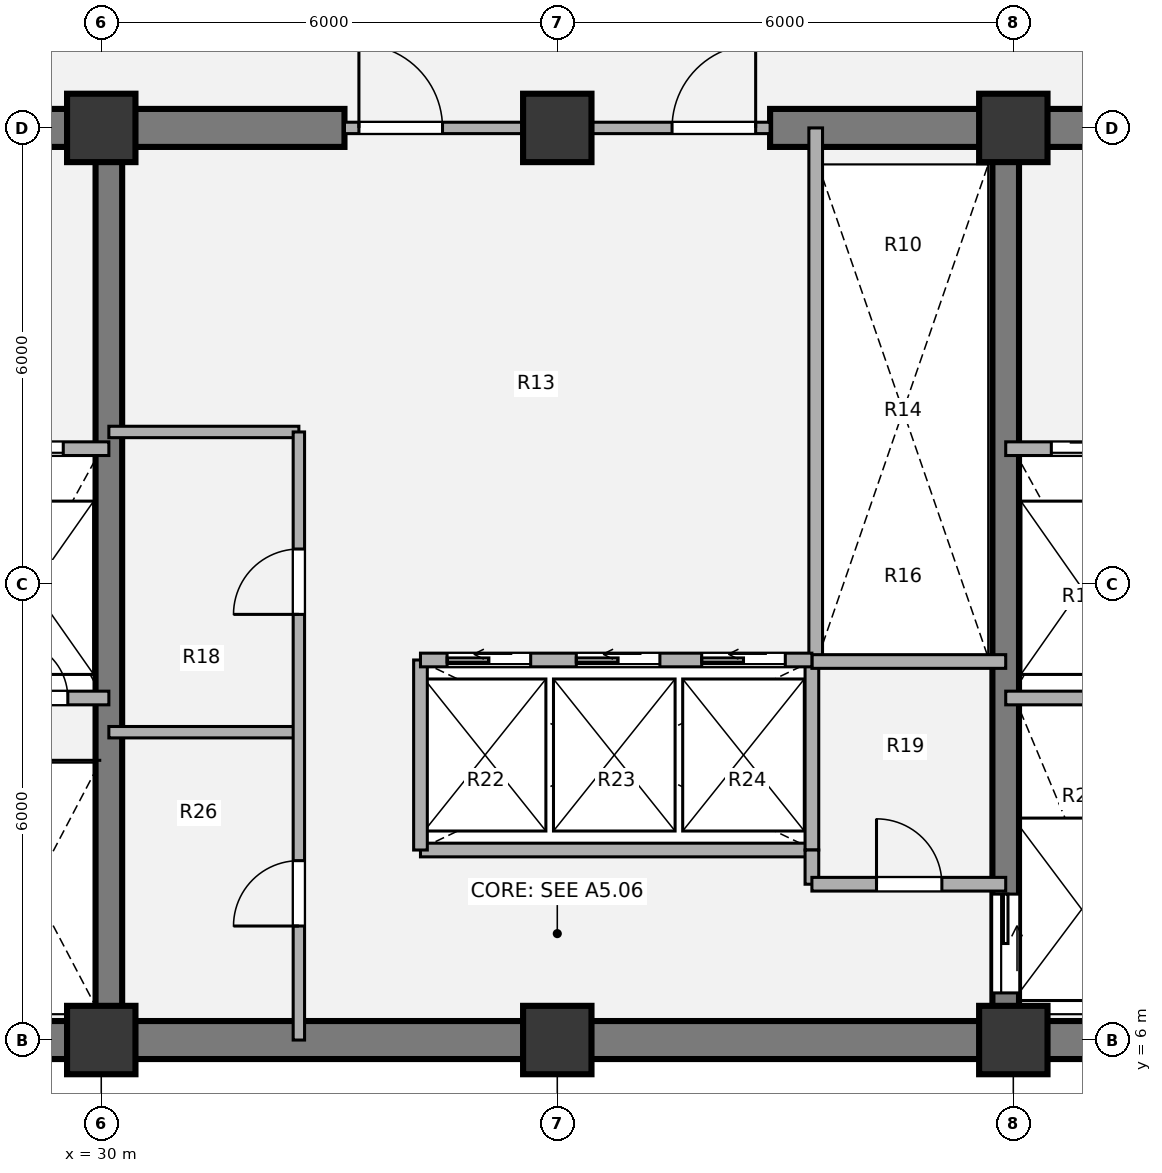
"""IFC4 building model, lengths in metres.
Left out: names, types, materials, properties, quantities, classifications, styles, units other than length and angle.
Written with IfcOpenShell. Run it as: python <this file> out.ifc"""

import sys

from ifc_helpers import new_model, si_unit, direction, frame, frame_2d, origin, origin_2d, place, context, subcontext, project, spatial, rectangle, extrude, source, transform, mapped, element, fill, save


model = new_model("IFC4")
c1 = context("Model", 3, precision=1e-05, world=origin(), true_north=direction((0.0, 1.0)))
c2 = subcontext(c1, "Body", "Model", "MODEL_VIEW")
j1 = project(units=[si_unit("LENGTHUNIT", "METRE"), si_unit("PLANEANGLEUNIT", "RADIAN")], contexts=[c1])
p1 = place(None, origin())
s1 = spatial("IfcSite", under=j1, at=p1, CompositionType="ELEMENT")
p2 = place(p1, origin())
s2 = spatial("IfcBuilding", under=s1, at=p2, CompositionType="ELEMENT")
p3 = place(p2, frame((0.0, 0.0, 112.5)))
s3 = spatial("IfcBuildingStorey", under=s2, at=p3, CompositionType="ELEMENT", Elevation=112.5)
m1 = source(origin(), c2, "Body", "SweptSolid", [
    extrude(rectangle(XDim=0.9, YDim=0.9, at=origin_2d()), origin(), (0.0, 0.0, 1.0), 3.78),
])
for number, where, z_axis, x_axis in (
    (1, (30.0, 6.0, 0.0), (0.0, 0.0, 1.0), (1.0, 0.0, 0.0)),
    (2, (36.0, 6.0, 0.0), (0.0, 0.0, 1.0), (1.0, 0.0, 0.0)),
    (3, (42.0, 6.0, 0.0), (0.0, 0.0, 1.0), (1.0, 0.0, 0.0)),
    (4, (30.0, 18.0, 0.0), (0.0, 0.0, 1.0), (1.0, 0.0, 0.0)),
    (5, (36.0, 18.0, 0.0), (0.0, 0.0, 1.0), (1.0, 0.0, 0.0)),
    (6, (42.0, 18.0, 0.0), (0.0, 0.0, 1.0), (1.0, 0.0, 0.0)),
):
    element("IfcColumn", number, at=place(p3, frame(where, z_axis=z_axis, x_axis=x_axis)), inside=s3, PredefinedType="COLUMN", context=c2, shape_type="MappedRepresentation", body=[
        mapped(m1, transform((0.0, 0.0, 0.0), x_axis=(1.0, 0.0, 0.0), y_axis=(0.0, 1.0, 0.0), z_axis=(0.0, 0.0, 1.0), scale=1.0)),
    ])
p4 = place(p3, frame((48.25, 6.0, 0.0), z_axis=(0.0, 0.0, 1.0), x_axis=(-1.0, 0.0, 0.0)))
e7 = element("IfcWall", 7, at=p4, inside=s3, PredefinedType="SHEAR", context=c2, shape_type="SweptSolid", body=[
    extrude(rectangle(XDim=24.5, YDim=0.5, at=frame_2d((12.25, 0.0))), origin(), (0.0, 0.0, 1.0), 3.78),
])
p5 = place(p3, frame((23.75, 18.0, 0.0), z_axis=(0.0, 0.0, 1.0), x_axis=(1.0, 0.0, 0.0)))
e8 = element("IfcWall", 8, at=p5, inside=s3, PredefinedType="SHEAR", context=c2, shape_type="SweptSolid", body=[
    extrude(rectangle(XDim=9.45, YDim=0.5, at=frame_2d((4.725, 0.0))), origin(), (0.0, 0.0, 1.0), 3.78),
])
p6 = place(p5, frame((2.95, 0.0, 0.0)))
e9 = element("IfcOpeningElement", 9, at=p6, cuts=e8, PredefinedType="OPENING", context=c2, shape_type="SweptSolid", body=[
    extrude(rectangle(XDim=1.1, YDim=2.1, at=origin_2d()), frame((0.55, 0.26, 1.05), z_axis=(0.0, -1.0, 0.0), x_axis=(1.0, 0.0, 0.0)), (0.0, 0.0, 1.0), 0.52),
])
p7 = place(p3, frame((38.8, 18.0, 0.0), z_axis=(0.0, 0.0, 1.0), x_axis=(1.0, 0.0, 0.0)))
e10 = element("IfcWall", 10, at=p7, inside=s3, PredefinedType="SHEAR", context=c2, shape_type="SweptSolid", body=[
    extrude(rectangle(XDim=9.45, YDim=0.5, at=frame_2d((4.725, 0.0))), origin(), (0.0, 0.0, 1.0), 3.78),
])
p8 = place(p7, frame((5.45, 0.0, 0.0)))
e11 = element("IfcOpeningElement", 11, at=p8, cuts=e10, PredefinedType="OPENING", context=c2, shape_type="SweptSolid", body=[
    extrude(rectangle(XDim=1.1, YDim=2.1, at=origin_2d()), frame((0.55, 0.26, 1.05), z_axis=(0.0, -1.0, 0.0), x_axis=(1.0, 0.0, 0.0)), (0.0, 0.0, 1.0), 0.52),
])
p9 = place(p3, frame((30.1, 6.0, 0.0), z_axis=(0.0, 0.0, 1.0), x_axis=(0.0, 1.0, 0.0)))
e12 = element("IfcWall", 12, at=p9, inside=s3, PredefinedType="SHEAR", context=c2, shape_type="SweptSolid", body=[
    extrude(rectangle(XDim=12.0, YDim=0.35, at=frame_2d((6.0, 0.0))), origin(), (0.0, 0.0, 1.0), 3.78),
])
p10 = place(p3, frame((41.9, 18.0, 0.0), z_axis=(0.0, 0.0, 1.0), x_axis=(0.0, -1.0, 0.0)))
e13 = element("IfcWall", 13, at=p10, inside=s3, PredefinedType="SHEAR", context=c2, shape_type="SweptSolid", body=[
    extrude(rectangle(XDim=12.0, YDim=0.35, at=frame_2d((6.0, 0.0))), origin(), (0.0, 0.0, 1.0), 3.78),
])
p11 = place(p10, frame((10.08, 0.0, 0.0)))
e14 = element("IfcOpeningElement", 14, at=p11, cuts=e13, PredefinedType="OPENING", context=c2, shape_type="SweptSolid", body=[
    extrude(rectangle(XDim=1.3, YDim=2.1, at=origin_2d()), frame((0.65, 0.185, 1.05), z_axis=(0.0, -1.0, 0.0), x_axis=(1.0, 0.0, 0.0)), (0.0, 0.0, 1.0), 0.37),
])
p12 = place(p3, frame((30.1, 14.0, 0.0), z_axis=(0.0, 0.0, 1.0), x_axis=(1.0, 0.0, 0.0)))
e15 = element("IfcWall", 15, at=p12, inside=s3, PredefinedType="PARTITIONING", context=c2, shape_type="SweptSolid", body=[
    extrude(rectangle(XDim=2.5, YDim=0.15, at=frame_2d((1.25, 0.0))), origin(), (0.0, 0.0, 1.0), 3.5),
])
p13 = place(p3, frame((34.2, 8.5, 0.0), z_axis=(0.0, 0.0, 1.0), x_axis=(1.0, 0.0, 0.0)))
e16 = element("IfcWall", 16, at=p13, inside=s3, PredefinedType="PARTITIONING", context=c2, shape_type="SweptSolid", body=[
    extrude(rectangle(XDim=5.15, YDim=0.18, at=frame_2d((2.575, 0.0))), origin(), (0.0, 0.0, 1.0), 3.5),
])
for number, where, z_axis, x_axis in (
    (17, (34.2, 8.5, 0.0), (0.0, 0.0, 1.0), (0.0, 1.0, 0.0)),
    (18, (39.35, 8.5, 0.0), (0.0, 0.0, 1.0), (0.0, 1.0, 0.0)),
):
    element("IfcWall", number, at=place(p3, frame(where, z_axis=z_axis, x_axis=x_axis)), inside=s3, PredefinedType="PARTITIONING", context=c2, shape_type="SweptSolid", body=[
        extrude(rectangle(XDim=2.5, YDim=0.18, at=frame_2d((1.25, 0.0))), origin(), (0.0, 0.0, 1.0), 3.5),
    ])
p14 = place(p3, frame((39.4, 11.0, 0.0), z_axis=(0.0, 0.0, 1.0), x_axis=(0.0, 1.0, 0.0)))
e19 = element("IfcWall", 19, at=p14, inside=s3, PredefinedType="PARTITIONING", context=c2, shape_type="SweptSolid", body=[
    extrude(rectangle(XDim=7.0, YDim=0.18, at=frame_2d((3.5, 0.0))), origin(), (0.0, 0.0, 1.0), 3.5),
])
p15 = place(p3, frame((30.1, 10.05, 0.0), z_axis=(0.0, 0.0, 1.0), x_axis=(1.0, 0.0, 0.0)))
e20 = element("IfcWall", 20, at=p15, inside=s3, PredefinedType="PARTITIONING", context=c2, shape_type="SweptSolid", body=[
    extrude(rectangle(XDim=2.5, YDim=0.15, at=frame_2d((1.25, 0.0))), origin(), (0.0, 0.0, 1.0), 3.5),
])
p16 = place(p3, frame((32.6, 6.0, 0.0), z_axis=(0.0, 0.0, 1.0), x_axis=(0.0, 1.0, 0.0)))
e21 = element("IfcWall", 21, at=p16, inside=s3, PredefinedType="PARTITIONING", context=c2, shape_type="SweptSolid", body=[
    extrude(rectangle(XDim=8.0, YDim=0.15, at=frame_2d((4.0, 0.0))), origin(), (0.0, 0.0, 1.0), 3.5),
])
p17 = place(p16, frame((1.5, 0.0, 0.0)))
e22 = element("IfcOpeningElement", 22, at=p17, cuts=e21, PredefinedType="OPENING", context=c2, shape_type="SweptSolid", body=[
    extrude(rectangle(XDim=0.86, YDim=2.1, at=origin_2d()), frame((0.43, 0.085, 1.05), z_axis=(0.0, -1.0, 0.0), x_axis=(1.0, 0.0, 0.0)), (0.0, 0.0, 1.0), 0.17),
])
p18 = place(p16, frame((5.6, 0.0, 0.0)))
e23 = element("IfcOpeningElement", 23, at=p18, cuts=e21, PredefinedType="OPENING", context=c2, shape_type="SweptSolid", body=[
    extrude(rectangle(XDim=0.86, YDim=2.1, at=origin_2d()), frame((0.43, 0.085, 1.05), z_axis=(0.0, -1.0, 0.0), x_axis=(1.0, 0.0, 0.0)), (0.0, 0.0, 1.0), 0.17),
])
p19 = place(p3, frame((39.35, 10.98, 0.0), z_axis=(0.0, 0.0, 1.0), x_axis=(1.0, 0.0, 0.0)))
e24 = element("IfcWall", 24, at=p19, inside=s3, PredefinedType="PARTITIONING", context=c2, shape_type="SweptSolid", body=[
    extrude(rectangle(XDim=2.55, YDim=0.18, at=frame_2d((1.275, 0.0))), origin(), (0.0, 0.0, 1.0), 3.5),
])
p20 = place(p3, frame((39.35, 8.05, 0.0), z_axis=(0.0, 0.0, 1.0), x_axis=(0.0, 1.0, 0.0)))
e25 = element("IfcWall", 25, at=p20, inside=s3, PredefinedType="PARTITIONING", context=c2, shape_type="SweptSolid", body=[
    extrude(rectangle(XDim=0.45, YDim=0.18, at=frame_2d((0.225, 0.0))), origin(), (0.0, 0.0, 1.0), 3.5),
])
p21 = place(p3, frame((39.35, 8.05, 0.0), z_axis=(0.0, 0.0, 1.0), x_axis=(1.0, 0.0, 0.0)))
e26 = element("IfcWall", 26, at=p21, inside=s3, PredefinedType="PARTITIONING", context=c2, shape_type="SweptSolid", body=[
    extrude(rectangle(XDim=2.55, YDim=0.18, at=frame_2d((1.275, 0.0))), origin(), (0.0, 0.0, 1.0), 3.5),
])
p22 = place(p21, frame((0.85, 0.0, 0.0)))
e27 = element("IfcOpeningElement", 27, at=p22, cuts=e26, PredefinedType="OPENING", context=c2, shape_type="SweptSolid", body=[
    extrude(rectangle(XDim=0.86, YDim=2.1, at=origin_2d()), frame((0.43, 0.1, 1.05), z_axis=(0.0, -1.0, 0.0), x_axis=(1.0, 0.0, 0.0)), (0.0, 0.0, 1.0), 0.2),
])
p23 = place(p3, frame((33.2, 18.0, 0.0), z_axis=(0.0, 0.0, 1.0), x_axis=(1.0, 0.0, 0.0)))
e28 = element("IfcWall", 28, at=p23, inside=s3, PredefinedType="PARTITIONING", context=c2, shape_type="SweptSolid", body=[
    extrude(rectangle(XDim=5.6, YDim=0.15, at=frame_2d((2.8, 0.0))), origin(), (0.0, 0.0, 1.0), 2.315),
])
p24 = place(p23, frame((0.19, 0.0, 0.0)))
e29 = element("IfcOpeningElement", 29, at=p24, cuts=e28, PredefinedType="OPENING", context=c2, shape_type="SweptSolid", body=[
    extrude(rectangle(XDim=1.1, YDim=2.1, at=origin_2d()), frame((0.55, 0.085, 1.05), z_axis=(0.0, -1.0, 0.0), x_axis=(1.0, 0.0, 0.0)), (0.0, 0.0, 1.0), 0.17),
])
p25 = place(p23, frame((4.31, 0.0, 0.0)))
e30 = element("IfcOpeningElement", 30, at=p25, cuts=e28, PredefinedType="OPENING", context=c2, shape_type="SweptSolid", body=[
    extrude(rectangle(XDim=1.1, YDim=2.1, at=origin_2d()), frame((0.55, 0.085, 1.05), z_axis=(0.0, -1.0, 0.0), x_axis=(1.0, 0.0, 0.0)), (0.0, 0.0, 1.0), 0.17),
])
p26 = place(p3, frame((24.0, 13.78, 0.0), z_axis=(0.0, 0.0, 1.0), x_axis=(1.0, 0.0, 0.0)))
e31 = element("IfcWall", 31, at=p26, inside=s3, PredefinedType="PARTITIONING", context=c2, shape_type="SweptSolid", body=[
    extrude(rectangle(XDim=6.1, YDim=0.18, at=frame_2d((3.05, 0.0))), origin(), (0.0, 0.0, 1.0), 3.5),
])
p27 = place(p26, frame((1.15, 0.0, 0.0)))
e32 = element("IfcOpeningElement", 32, at=p27, cuts=e31, PredefinedType="OPENING", context=c2, shape_type="SweptSolid", body=[
    extrude(rectangle(XDim=1.1, YDim=2.1, at=origin_2d()), frame((0.55, 0.1, 1.05), z_axis=(0.0, -1.0, 0.0), x_axis=(1.0, 0.0, 0.0)), (0.0, 0.0, 1.0), 0.2),
])
p28 = place(p26, frame((4.4, 0.0, 0.0)))
e33 = element("IfcOpeningElement", 33, at=p28, cuts=e31, PredefinedType="OPENING", context=c2, shape_type="SweptSolid", body=[
    extrude(rectangle(XDim=1.1, YDim=2.1, at=origin_2d()), frame((0.55, 0.1, 1.05), z_axis=(0.0, -1.0, 0.0), x_axis=(1.0, 0.0, 0.0)), (0.0, 0.0, 1.0), 0.2),
])
p29 = place(p3, frame((28.15, 10.5, 0.0), z_axis=(0.0, 0.0, 1.0), x_axis=(1.0, 0.0, 0.0)))
e34 = element("IfcWall", 34, at=p29, inside=s3, PredefinedType="PARTITIONING", context=c2, shape_type="SweptSolid", body=[
    extrude(rectangle(XDim=1.95, YDim=0.18, at=frame_2d((0.975, 0.0))), origin(), (0.0, 0.0, 1.0), 3.5),
])
p30 = place(p29, frame((0.65, 0.0, 0.0)))
e35 = element("IfcOpeningElement", 35, at=p30, cuts=e34, PredefinedType="OPENING", context=c2, shape_type="SweptSolid", body=[
    extrude(rectangle(XDim=0.76, YDim=2.05, at=origin_2d()), frame((0.38, 0.1, 1.025), z_axis=(0.0, -1.0, 0.0), x_axis=(1.0, 0.0, 0.0)), (0.0, 0.0, 1.0), 0.2),
])
p31 = place(p3, frame((41.9, 13.78, 0.0), z_axis=(0.0, 0.0, 1.0), x_axis=(1.0, 0.0, 0.0)))
e36 = element("IfcWall", 36, at=p31, inside=s3, PredefinedType="PARTITIONING", context=c2, shape_type="SweptSolid", body=[
    extrude(rectangle(XDim=6.1, YDim=0.18, at=frame_2d((3.05, 0.0))), origin(), (0.0, 0.0, 1.0), 3.5),
])
p32 = place(p31, frame((0.6, 0.0, 0.0)))
e37 = element("IfcOpeningElement", 37, at=p32, cuts=e36, PredefinedType="OPENING", context=c2, shape_type="SweptSolid", body=[
    extrude(rectangle(XDim=1.1, YDim=2.1, at=origin_2d()), frame((0.55, 0.1, 1.05), z_axis=(0.0, -1.0, 0.0), x_axis=(1.0, 0.0, 0.0)), (0.0, 0.0, 1.0), 0.2),
])
p33 = place(p31, frame((3.8, 0.0, 0.0)))
e38 = element("IfcOpeningElement", 38, at=p33, cuts=e36, PredefinedType="OPENING", context=c2, shape_type="SweptSolid", body=[
    extrude(rectangle(XDim=1.1, YDim=2.1, at=origin_2d()), frame((0.55, 0.1, 1.05), z_axis=(0.0, -1.0, 0.0), x_axis=(1.0, 0.0, 0.0)), (0.0, 0.0, 1.0), 0.2),
])
p34 = place(p3, frame((41.9, 10.5, 0.0), z_axis=(0.0, 0.0, 1.0), x_axis=(1.0, 0.0, 0.0)))
e39 = element("IfcWall", 39, at=p34, inside=s3, PredefinedType="PARTITIONING", context=c2, shape_type="SweptSolid", body=[
    extrude(rectangle(XDim=1.95, YDim=0.18, at=frame_2d((0.975, 0.0))), origin(), (0.0, 0.0, 1.0), 3.5),
])
p35 = place(p3, frame((34.2, 11.0, 0.0), z_axis=(0.0, 0.0, 1.0), x_axis=(1.0, 0.0, 0.0)))
e40 = element("IfcWall", 40, at=p35, inside=s3, PredefinedType="PARTITIONING", context=c2, shape_type="SweptSolid", body=[
    extrude(rectangle(XDim=5.15, YDim=0.18, at=frame_2d((2.575, 0.0))), origin(), (0.0, 0.0, 1.0), 3.5),
])
p36 = place(p35, frame((0.35, 0.0, 0.0)))
e41 = element("IfcOpeningElement", 41, at=p36, cuts=e40, PredefinedType="OPENING", context=c2, shape_type="SweptSolid", body=[
    extrude(rectangle(XDim=1.1, YDim=2.1, at=origin_2d()), frame((0.55, 0.1, 1.05), z_axis=(0.0, -1.0, 0.0), x_axis=(1.0, 0.0, 0.0)), (0.0, 0.0, 1.0), 0.2),
])
p37 = place(p35, frame((2.05, 0.0, 0.0)))
e42 = element("IfcOpeningElement", 42, at=p37, cuts=e40, PredefinedType="OPENING", context=c2, shape_type="SweptSolid", body=[
    extrude(rectangle(XDim=1.1, YDim=2.1, at=origin_2d()), frame((0.55, 0.1, 1.05), z_axis=(0.0, -1.0, 0.0), x_axis=(1.0, 0.0, 0.0)), (0.0, 0.0, 1.0), 0.2),
])
p38 = place(p35, frame((3.7, 0.0, 0.0)))
e43 = element("IfcOpeningElement", 43, at=p38, cuts=e40, PredefinedType="OPENING", context=c2, shape_type="SweptSolid", body=[
    extrude(rectangle(XDim=1.1, YDim=2.1, at=origin_2d()), frame((0.55, 0.1, 1.05), z_axis=(0.0, -1.0, 0.0), x_axis=(1.0, 0.0, 0.0)), (0.0, 0.0, 1.0), 0.2),
])
m2 = source(origin(), c2, "Body", "SweptSolid", [
    extrude(rectangle(XDim=0.86, YDim=2.1, at=origin_2d()), frame((0.43, 0.025, 1.05), z_axis=(0.0, -1.0, 0.0), x_axis=(1.0, 0.0, 0.0)), (0.0, 0.0, 1.0), 0.05),
])
p39 = place(p17, origin())
e44 = element("IfcDoor", 44, at=p39, inside=s3, OperationType="SINGLE_SWING_LEFT", PredefinedType="DOOR", context=c2, shape_type="MappedRepresentation", body=[
    mapped(m2, transform((0.0, 0.0, 0.0), x_axis=(1.0, 0.0, 0.0), y_axis=(0.0, 1.0, 0.0), z_axis=(0.0, 0.0, 1.0), scale=1.0)),
])
fill(e22, e44)
p40 = place(p18, origin())
e45 = element("IfcDoor", 45, at=p40, inside=s3, OperationType="SINGLE_SWING_LEFT", PredefinedType="DOOR", context=c2, shape_type="MappedRepresentation", body=[
    mapped(m2, transform((0.0, 0.0, 0.0), x_axis=(1.0, 0.0, 0.0), y_axis=(0.0, 1.0, 0.0), z_axis=(0.0, 0.0, 1.0), scale=1.0)),
])
fill(e23, e45)
p41 = place(p22, origin())
e46 = element("IfcDoor", 46, at=p41, inside=s3, OperationType="SINGLE_SWING_LEFT", PredefinedType="DOOR", context=c2, shape_type="MappedRepresentation", body=[
    mapped(m2, transform((0.0, 0.0, 0.0), x_axis=(1.0, 0.0, 0.0), y_axis=(0.0, 1.0, 0.0), z_axis=(0.0, 0.0, 1.0), scale=1.0)),
])
fill(e27, e46)
m3 = source(origin(), c2, "Body", "SweptSolid", [
    extrude(rectangle(XDim=1.1, YDim=2.1, at=origin_2d()), frame((0.55, 0.025, 1.05), z_axis=(0.0, -1.0, 0.0), x_axis=(1.0, 0.0, 0.0)), (0.0, 0.0, 1.0), 0.05),
])
p42 = place(p24, origin())
e47 = element("IfcDoor", 47, at=p42, inside=s3, OperationType="SINGLE_SWING_LEFT", PredefinedType="DOOR", context=c2, shape_type="MappedRepresentation", body=[
    mapped(m3, transform((0.0, 0.0, 0.0), x_axis=(1.0, 0.0, 0.0), y_axis=(0.0, 1.0, 0.0), z_axis=(0.0, 0.0, 1.0), scale=1.0)),
])
fill(e29, e47)
p43 = place(p25, origin())
e48 = element("IfcDoor", 48, at=p43, inside=s3, OperationType="SINGLE_SWING_RIGHT", PredefinedType="DOOR", context=c2, shape_type="MappedRepresentation", body=[
    mapped(m3, transform((0.0, 0.0, 0.0), x_axis=(1.0, 0.0, 0.0), y_axis=(0.0, 1.0, 0.0), z_axis=(0.0, 0.0, 1.0), scale=1.0)),
])
fill(e30, e48)
m4 = source(origin(), c2, "Body", "SweptSolid", [
    extrude(rectangle(XDim=1.1, YDim=2.1, at=origin_2d()), frame((0.55, 0.025, 1.05), z_axis=(0.0, -1.0, 0.0), x_axis=(1.0, 0.0, 0.0)), (0.0, 0.0, 1.0), 0.05),
])
p44 = place(p28, origin())
e49 = element("IfcDoor", 49, at=p44, inside=s3, OperationType="SLIDING_TO_LEFT", PredefinedType="DOOR", context=c2, shape_type="MappedRepresentation", body=[
    mapped(m4, transform((0.0, 0.0, 0.0), x_axis=(1.0, 0.0, 0.0), y_axis=(0.0, 1.0, 0.0), z_axis=(0.0, 0.0, 1.0), scale=1.0)),
])
fill(e33, e49)
m5 = source(origin(), c2, "Body", "SweptSolid", [
    extrude(rectangle(XDim=0.76, YDim=2.05, at=origin_2d()), frame((0.38, 0.025, 1.025), z_axis=(0.0, -1.0, 0.0), x_axis=(1.0, 0.0, 0.0)), (0.0, 0.0, 1.0), 0.05),
])
p45 = place(p30, origin())
e50 = element("IfcDoor", 50, at=p45, inside=s3, OperationType="SINGLE_SWING_LEFT", PredefinedType="DOOR", context=c2, shape_type="MappedRepresentation", body=[
    mapped(m5, transform((0.0, 0.0, 0.0), x_axis=(1.0, 0.0, 0.0), y_axis=(0.0, 1.0, 0.0), z_axis=(0.0, 0.0, 1.0), scale=1.0)),
])
fill(e35, e50)
p46 = place(p32, origin())
e51 = element("IfcDoor", 51, at=p46, inside=s3, OperationType="SLIDING_TO_RIGHT", PredefinedType="DOOR", context=c2, shape_type="MappedRepresentation", body=[
    mapped(m4, transform((0.0, 0.0, 0.0), x_axis=(1.0, 0.0, 0.0), y_axis=(0.0, 1.0, 0.0), z_axis=(0.0, 0.0, 1.0), scale=1.0)),
])
fill(e37, e51)
m6 = source(origin(), c2, "Body", "SweptSolid", [
    extrude(rectangle(XDim=1.3, YDim=2.1, at=origin_2d()), frame((0.65, 0.025, 1.05), z_axis=(0.0, -1.0, 0.0), x_axis=(1.0, 0.0, 0.0)), (0.0, 0.0, 1.0), 0.05),
])
p47 = place(p11, origin())
e52 = element("IfcDoor", 52, at=p47, inside=s3, OperationType="SLIDING_TO_LEFT", PredefinedType="DOOR", context=c2, shape_type="MappedRepresentation", body=[
    mapped(m6, transform((0.0, 0.0, 0.0), x_axis=(1.0, 0.0, 0.0), y_axis=(0.0, 1.0, 0.0), z_axis=(0.0, 0.0, 1.0), scale=1.0)),
])
fill(e14, e52)
p48 = place(p36, origin())
e53 = element("IfcDoor", 53, at=p48, inside=s3, OperationType="SLIDING_TO_LEFT", PredefinedType="DOOR", context=c2, shape_type="MappedRepresentation", body=[
    mapped(m4, transform((0.0, 0.0, 0.0), x_axis=(1.0, 0.0, 0.0), y_axis=(0.0, 1.0, 0.0), z_axis=(0.0, 0.0, 1.0), scale=1.0)),
])
fill(e41, e53)
p49 = place(p37, origin())
e54 = element("IfcDoor", 54, at=p49, inside=s3, OperationType="SLIDING_TO_LEFT", PredefinedType="DOOR", context=c2, shape_type="MappedRepresentation", body=[
    mapped(m4, transform((0.0, 0.0, 0.0), x_axis=(1.0, 0.0, 0.0), y_axis=(0.0, 1.0, 0.0), z_axis=(0.0, 0.0, 1.0), scale=1.0)),
])
fill(e42, e54)
p50 = place(p38, origin())
e55 = element("IfcDoor", 55, at=p50, inside=s3, OperationType="SLIDING_TO_LEFT", PredefinedType="DOOR", context=c2, shape_type="MappedRepresentation", body=[
    mapped(m4, transform((0.0, 0.0, 0.0), x_axis=(1.0, 0.0, 0.0), y_axis=(0.0, 1.0, 0.0), z_axis=(0.0, 0.0, 1.0), scale=1.0)),
])
fill(e43, e55)
save(model, sys.argv[1])
